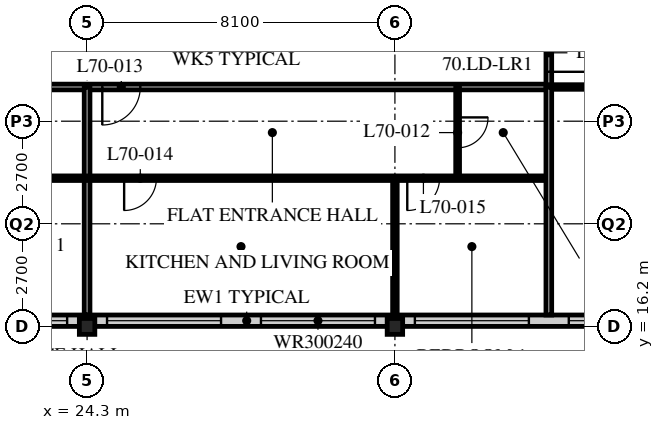
"""IFC4 building model, lengths in metres.
Left out: names, types, materials, properties, quantities, classifications, styles, units other than length and angle.
Written with IfcOpenShell. Run it as: python <this file> out.ifc"""

import sys

from ifc_helpers import new_model, si_unit, direction, frame, frame_2d, origin, origin_2d, place, context, subcontext, project, spatial, rectangle, i_section, extrude, element, fill, save


model = new_model("IFC4")
c1 = context("Model", 3, precision=1e-05, world=origin(), true_north=direction((0.0, 1.0)))
c2 = subcontext(c1, "Body", "Model", "MODEL_VIEW")
j1 = project(units=[si_unit("LENGTHUNIT", "METRE"), si_unit("PLANEANGLEUNIT", "RADIAN")], contexts=[c1])
p1 = place(None, origin())
s1 = spatial("IfcSite", under=j1, at=p1, CompositionType="ELEMENT")
p2 = place(p1, origin())
s2 = spatial("IfcBuilding", under=s1, at=p2, CompositionType="ELEMENT")
p3 = place(p2, frame((0.0, 0.0, 273.6)))
s3 = spatial("IfcBuildingStorey", under=s2, at=p3, CompositionType="ELEMENT", Elevation=273.6)
for number, where, z_axis, x_axis in (
    (1, (24.3, 16.2, 0.0), (0.0, 0.0, 1.0), (1.0, 0.0, 0.0)),
    (2, (32.4, 16.2, 0.0), (0.0, 0.0, 1.0), (1.0, 0.0, 0.0)),
):
    element("IfcColumn", number, at=place(p3, frame(where, z_axis=z_axis, x_axis=x_axis)), inside=s3, PredefinedType="COLUMN", context=c2, shape_type="SweptSolid", body=[
        extrude(i_section(OverallWidth=0.407, OverallDepth=0.419, WebThickness=0.031, FlangeThickness=0.049, FilletRadius=0.015, at=origin_2d()), origin(), (0.0, 0.0, 1.0), 3.9),
    ])
p4 = place(p3, frame((8.4, 16.35, 0.0), z_axis=(0.0, 0.0, 1.0), x_axis=(1.0, 0.0, 0.0)))
e3 = element("IfcWall", 3, at=p4, inside=s3, PredefinedType="SOLIDWALL", context=c2, shape_type="SweptSolid", body=[
    extrude(rectangle(XDim=40.2, YDim=0.3, at=frame_2d((20.1, 0.0))), origin(), (0.0, 0.0, 1.0), 3.69),
])
p5 = place(p4, frame((0.225, 0.0, 0.6)))
e4 = element("IfcOpeningElement", 4, at=p5, cuts=e3, PredefinedType="OPENING", context=c2, shape_type="SweptSolid", body=[
    extrude(rectangle(XDim=3.0, YDim=2.4, at=frame_2d((1.5, 1.2))), frame((0.0, 0.16, 0.0), z_axis=(0.0, -1.0, 0.0), x_axis=(1.0, 0.0, 0.0)), (0.0, 0.0, 1.0), 0.32),
])
p6 = place(p4, frame((4.275, 0.0, 0.6)))
e5 = element("IfcOpeningElement", 5, at=p6, cuts=e3, PredefinedType="OPENING", context=c2, shape_type="SweptSolid", body=[
    extrude(rectangle(XDim=3.0, YDim=2.4, at=frame_2d((1.5, 1.2))), frame((0.0, 0.16, 0.0), z_axis=(0.0, -1.0, 0.0), x_axis=(1.0, 0.0, 0.0)), (0.0, 0.0, 1.0), 0.32),
])
p7 = place(p4, frame((8.325, 0.0, 0.6)))
e6 = element("IfcOpeningElement", 6, at=p7, cuts=e3, PredefinedType="OPENING", context=c2, shape_type="SweptSolid", body=[
    extrude(rectangle(XDim=3.0, YDim=2.4, at=frame_2d((1.5, 1.2))), frame((0.0, 0.16, 0.0), z_axis=(0.0, -1.0, 0.0), x_axis=(1.0, 0.0, 0.0)), (0.0, 0.0, 1.0), 0.32),
])
p8 = place(p4, frame((12.375, 0.0, 0.6)))
e7 = element("IfcOpeningElement", 7, at=p8, cuts=e3, PredefinedType="OPENING", context=c2, shape_type="SweptSolid", body=[
    extrude(rectangle(XDim=3.0, YDim=2.4, at=frame_2d((1.5, 1.2))), frame((0.0, 0.16, 0.0), z_axis=(0.0, -1.0, 0.0), x_axis=(1.0, 0.0, 0.0)), (0.0, 0.0, 1.0), 0.32),
])
p9 = place(p4, frame((16.425, 0.0, 0.6)))
e8 = element("IfcOpeningElement", 8, at=p9, cuts=e3, PredefinedType="OPENING", context=c2, shape_type="SweptSolid", body=[
    extrude(rectangle(XDim=3.0, YDim=2.4, at=frame_2d((1.5, 1.2))), frame((0.0, 0.16, 0.0), z_axis=(0.0, -1.0, 0.0), x_axis=(1.0, 0.0, 0.0)), (0.0, 0.0, 1.0), 0.32),
])
p10 = place(p4, frame((20.475, 0.0, 0.6)))
e9 = element("IfcOpeningElement", 9, at=p10, cuts=e3, PredefinedType="OPENING", context=c2, shape_type="SweptSolid", body=[
    extrude(rectangle(XDim=3.0, YDim=2.4, at=frame_2d((1.5, 1.2))), frame((0.0, 0.16, 0.0), z_axis=(0.0, -1.0, 0.0), x_axis=(1.0, 0.0, 0.0)), (0.0, 0.0, 1.0), 0.32),
])
p11 = place(p4, frame((24.525, 0.0, 0.6)))
e10 = element("IfcOpeningElement", 10, at=p11, cuts=e3, PredefinedType="OPENING", context=c2, shape_type="SweptSolid", body=[
    extrude(rectangle(XDim=3.0, YDim=2.4, at=frame_2d((1.5, 1.2))), frame((0.0, 0.16, 0.0), z_axis=(0.0, -1.0, 0.0), x_axis=(1.0, 0.0, 0.0)), (0.0, 0.0, 1.0), 0.32),
])
p12 = place(p4, frame((28.575, 0.0, 0.6)))
e11 = element("IfcOpeningElement", 11, at=p12, cuts=e3, PredefinedType="OPENING", context=c2, shape_type="SweptSolid", body=[
    extrude(rectangle(XDim=3.0, YDim=2.4, at=frame_2d((1.5, 1.2))), frame((0.0, 0.16, 0.0), z_axis=(0.0, -1.0, 0.0), x_axis=(1.0, 0.0, 0.0)), (0.0, 0.0, 1.0), 0.32),
])
p13 = place(p4, frame((32.625, 0.0, 0.6)))
e12 = element("IfcOpeningElement", 12, at=p13, cuts=e3, PredefinedType="OPENING", context=c2, shape_type="SweptSolid", body=[
    extrude(rectangle(XDim=3.0, YDim=2.4, at=frame_2d((1.5, 1.2))), frame((0.0, 0.16, 0.0), z_axis=(0.0, -1.0, 0.0), x_axis=(1.0, 0.0, 0.0)), (0.0, 0.0, 1.0), 0.32),
])
p14 = place(p4, frame((36.675, 0.0, 0.6)))
e13 = element("IfcOpeningElement", 13, at=p14, cuts=e3, PredefinedType="OPENING", context=c2, shape_type="SweptSolid", body=[
    extrude(rectangle(XDim=3.0, YDim=2.4, at=frame_2d((1.5, 1.2))), frame((0.0, 0.16, 0.0), z_axis=(0.0, -1.0, 0.0), x_axis=(1.0, 0.0, 0.0)), (0.0, 0.0, 1.0), 0.32),
])
p15 = place(p3, frame((12.15, 22.5, 0.0), z_axis=(0.0, 0.0, 1.0), x_axis=(1.0, 0.0, 0.0)))
e14 = element("IfcWall", 14, at=p15, inside=s3, PredefinedType="PARTITIONING", context=c2, shape_type="SweptSolid", body=[
    extrude(rectangle(XDim=24.3, YDim=0.15, at=frame_2d((12.15, 0.0))), origin(), (0.0, 0.0, 1.0), 3.69),
])
p16 = place(p15, frame((4.45, 0.0, 0.0)))
e15 = element("IfcOpeningElement", 15, at=p16, cuts=e14, PredefinedType="OPENING", context=c2, shape_type="SweptSolid", body=[
    extrude(rectangle(XDim=1.0, YDim=2.1, at=frame_2d((0.5, 1.05))), frame((0.0, 0.085, 0.0), z_axis=(0.0, -1.0, 0.0), x_axis=(1.0, 0.0, 0.0)), (0.0, 0.0, 1.0), 0.17),
])
p17 = place(p15, frame((12.55, 0.0, 0.0)))
e16 = element("IfcOpeningElement", 16, at=p17, cuts=e14, PredefinedType="OPENING", context=c2, shape_type="SweptSolid", body=[
    extrude(rectangle(XDim=1.0, YDim=2.1, at=frame_2d((0.5, 1.05))), frame((0.0, 0.085, 0.0), z_axis=(0.0, -1.0, 0.0), x_axis=(1.0, 0.0, 0.0)), (0.0, 0.0, 1.0), 0.17),
])
p18 = place(p15, frame((2.625, 0.0, 0.0)))
e17 = element("IfcOpeningElement", 17, at=p18, cuts=e14, PredefinedType="OPENING", context=c2, shape_type="SweptSolid", body=[
    extrude(rectangle(XDim=1.0, YDim=2.1, at=frame_2d((0.5, 1.05))), frame((0.0, 0.085, 0.0), z_axis=(0.0, -1.0, 0.0), x_axis=(1.0, 0.0, 0.0)), (0.0, 0.0, 1.0), 0.17),
])
p19 = place(p3, frame((36.45, 22.5, 0.0), z_axis=(0.0, 0.0, 1.0), x_axis=(0.0, 1.0, 0.0)))
e18 = element("IfcWall", 18, at=p19, inside=s3, PredefinedType="PARTITIONING", context=c2, shape_type="SweptSolid", body=[
    extrude(rectangle(XDim=1.8, YDim=0.15, at=frame_2d((0.9, 0.0))), origin(), (0.0, 0.0, 1.0), 3.69),
])
p20 = place(p19, frame((0.4, 0.0, 0.0)))
e19 = element("IfcOpeningElement", 19, at=p20, cuts=e18, PredefinedType="OPENING", context=c2, shape_type="SweptSolid", body=[
    extrude(rectangle(XDim=1.0, YDim=2.1, at=frame_2d((0.5, 1.05))), frame((0.0, 0.085, 0.0), z_axis=(0.0, -1.0, 0.0), x_axis=(1.0, 0.0, 0.0)), (0.0, 0.0, 1.0), 0.17),
])
p21 = place(p3, frame((24.3, 22.5, 0.0), z_axis=(0.0, 0.0, 1.0), x_axis=(0.0, -1.0, 0.0)))
e20 = element("IfcWall", 20, at=p21, inside=s3, PredefinedType="PARTITIONING", context=c2, shape_type="SweptSolid", body=[
    extrude(rectangle(XDim=6.0, YDim=0.15, at=frame_2d((3.0, 0.0))), origin(), (0.0, 0.0, 1.0), 3.078),
])
p22 = place(p3, frame((34.05, 22.5, 0.0), z_axis=(0.0, 0.0, 1.0), x_axis=(0.0, -1.0, 0.0)))
e21 = element("IfcWall", 21, at=p22, inside=s3, PredefinedType="PARTITIONING", context=c2, shape_type="SweptSolid", body=[
    extrude(rectangle(XDim=2.4, YDim=0.1, at=frame_2d((1.2, 0.0))), origin(), (0.0, 0.0, 1.0), 3.69),
])
p23 = place(p22, frame((0.8, 0.0, 0.0)))
e22 = element("IfcOpeningElement", 22, at=p23, cuts=e21, PredefinedType="OPENING", context=c2, shape_type="SweptSolid", body=[
    extrude(rectangle(XDim=0.8, YDim=2.1, at=frame_2d((0.4, 1.05))), frame((0.0, 0.06, 0.0), z_axis=(0.0, -1.0, 0.0), x_axis=(1.0, 0.0, 0.0)), (0.0, 0.0, 1.0), 0.12),
])
p24 = place(p3, frame((32.4, 20.1, 0.0), z_axis=(0.0, 0.0, 1.0), x_axis=(0.0, -1.0, 0.0)))
e23 = element("IfcWall", 23, at=p24, inside=s3, PredefinedType="PARTITIONING", context=c2, shape_type="SweptSolid", body=[
    extrude(rectangle(XDim=3.6, YDim=0.12, at=frame_2d((1.8, 0.0))), origin(), (0.0, 0.0, 1.0), 3.078),
])
p25 = place(p3, frame((12.15, 20.1, 0.0), z_axis=(0.0, 0.0, 1.0), x_axis=(1.0, 0.0, 0.0)))
e24 = element("IfcWall", 24, at=p25, inside=s3, PredefinedType="PARTITIONING", context=c2, shape_type="SweptSolid", body=[
    extrude(rectangle(XDim=24.3, YDim=0.12, at=frame_2d((12.15, 0.0))), origin(), (0.0, 0.0, 1.0), 3.69),
])
p26 = place(p25, frame((5.025, 0.0, 0.0)))
e25 = element("IfcOpeningElement", 25, at=p26, cuts=e24, PredefinedType="OPENING", context=c2, shape_type="SweptSolid", body=[
    extrude(rectangle(XDim=0.85, YDim=2.1, at=frame_2d((0.425, 1.05))), frame((0.0, 0.07, 0.0), z_axis=(0.0, -1.0, 0.0), x_axis=(1.0, 0.0, 0.0)), (0.0, 0.0, 1.0), 0.14),
])
p27 = place(p25, frame((8.425, 0.0, 0.0)))
e26 = element("IfcOpeningElement", 26, at=p27, cuts=e24, PredefinedType="OPENING", context=c2, shape_type="SweptSolid", body=[
    extrude(rectangle(XDim=0.85, YDim=2.1, at=frame_2d((0.425, 1.05))), frame((0.0, 0.07, 0.0), z_axis=(0.0, -1.0, 0.0), x_axis=(1.0, 0.0, 0.0)), (0.0, 0.0, 1.0), 0.14),
])
p28 = place(p25, frame((13.125, 0.0, 0.0)))
e27 = element("IfcOpeningElement", 27, at=p28, cuts=e24, PredefinedType="OPENING", context=c2, shape_type="SweptSolid", body=[
    extrude(rectangle(XDim=0.85, YDim=2.1, at=frame_2d((0.425, 1.05))), frame((0.0, 0.07, 0.0), z_axis=(0.0, -1.0, 0.0), x_axis=(1.0, 0.0, 0.0)), (0.0, 0.0, 1.0), 0.14),
])
p29 = place(p25, frame((20.575, 0.0, 0.0)))
e28 = element("IfcOpeningElement", 28, at=p29, cuts=e24, PredefinedType="OPENING", context=c2, shape_type="SweptSolid", body=[
    extrude(rectangle(XDim=0.85, YDim=2.1, at=frame_2d((0.425, 1.05))), frame((0.0, 0.07, 0.0), z_axis=(0.0, -1.0, 0.0), x_axis=(1.0, 0.0, 0.0)), (0.0, 0.0, 1.0), 0.14),
])
p30 = place(p25, frame((2.725, 0.0, 0.0)))
e29 = element("IfcOpeningElement", 29, at=p30, cuts=e24, PredefinedType="OPENING", context=c2, shape_type="SweptSolid", body=[
    extrude(rectangle(XDim=0.85, YDim=2.1, at=frame_2d((0.425, 1.05))), frame((0.0, 0.07, 0.0), z_axis=(0.0, -1.0, 0.0), x_axis=(1.0, 0.0, 0.0)), (0.0, 0.0, 1.0), 0.14),
])
p31 = place(p3, frame((36.45, 22.5, 0.0), z_axis=(0.0, 0.0, 1.0), x_axis=(1.0, 0.0, 0.0)))
e30 = element("IfcWall", 30, at=p31, inside=s3, PredefinedType="PARTITIONING", context=c2, shape_type="SweptSolid", body=[
    extrude(rectangle(XDim=6.45, YDim=0.12, at=frame_2d((3.225, 0.0))), origin(), (0.0, 0.0, 1.0), 3.69),
])
p32 = place(p31, frame((2.8, 0.0, 0.0)))
e31 = element("IfcOpeningElement", 31, at=p32, cuts=e30, PredefinedType="OPENING", context=c2, shape_type="SweptSolid", body=[
    extrude(rectangle(XDim=0.85, YDim=2.1, at=frame_2d((0.425, 1.05))), frame((0.0, 0.07, 0.0), z_axis=(0.0, -1.0, 0.0), x_axis=(1.0, 0.0, 0.0)), (0.0, 0.0, 1.0), 0.14),
])
p33 = place(p3, frame((36.45, 16.5, 0.0), z_axis=(0.0, 0.0, 1.0), x_axis=(0.0, 1.0, 0.0)))
e32 = element("IfcWall", 32, at=p33, inside=s3, PredefinedType="PARTITIONING", context=c2, shape_type="SweptSolid", body=[
    extrude(rectangle(XDim=6.0, YDim=0.15, at=frame_2d((3.0, 0.0))), origin(), (0.0, 0.0, 1.0), 3.69),
])
p34 = place(p8, origin())
e33 = element("IfcWindow", 33, at=p34, inside=s3, PartitioningType="SINGLE_PANEL", PredefinedType="WINDOW", context=c2, shape_type="SweptSolid", body=[
    extrude(rectangle(XDim=3.0, YDim=2.4, at=frame_2d((1.5, 1.2))), frame((0.0, 0.03, 0.0), z_axis=(0.0, -1.0, 0.0), x_axis=(1.0, 0.0, 0.0)), (0.0, 0.0, 1.0), 0.06),
])
fill(e7, e33)
p35 = place(p9, origin())
e34 = element("IfcWindow", 34, at=p35, inside=s3, PartitioningType="SINGLE_PANEL", PredefinedType="WINDOW", context=c2, shape_type="SweptSolid", body=[
    extrude(rectangle(XDim=3.0, YDim=2.4, at=frame_2d((1.5, 1.2))), frame((0.0, 0.03, 0.0), z_axis=(0.0, -1.0, 0.0), x_axis=(1.0, 0.0, 0.0)), (0.0, 0.0, 1.0), 0.06),
])
fill(e8, e34)
p36 = place(p10, origin())
e35 = element("IfcWindow", 35, at=p36, inside=s3, PartitioningType="SINGLE_PANEL", PredefinedType="WINDOW", context=c2, shape_type="SweptSolid", body=[
    extrude(rectangle(XDim=3.0, YDim=2.4, at=frame_2d((1.5, 1.2))), frame((0.0, 0.03, 0.0), z_axis=(0.0, -1.0, 0.0), x_axis=(1.0, 0.0, 0.0)), (0.0, 0.0, 1.0), 0.06),
])
fill(e9, e35)
p37 = place(p11, origin())
e36 = element("IfcWindow", 36, at=p37, inside=s3, PartitioningType="SINGLE_PANEL", PredefinedType="WINDOW", context=c2, shape_type="SweptSolid", body=[
    extrude(rectangle(XDim=3.0, YDim=2.4, at=frame_2d((1.5, 1.2))), frame((0.0, 0.03, 0.0), z_axis=(0.0, -1.0, 0.0), x_axis=(1.0, 0.0, 0.0)), (0.0, 0.0, 1.0), 0.06),
])
fill(e10, e36)
p38 = place(p12, origin())
e37 = element("IfcWindow", 37, at=p38, inside=s3, PartitioningType="SINGLE_PANEL", PredefinedType="WINDOW", context=c2, shape_type="SweptSolid", body=[
    extrude(rectangle(XDim=3.0, YDim=2.4, at=frame_2d((1.5, 1.2))), frame((0.0, 0.03, 0.0), z_axis=(0.0, -1.0, 0.0), x_axis=(1.0, 0.0, 0.0)), (0.0, 0.0, 1.0), 0.06),
])
fill(e11, e37)
p39 = place(p23, origin())
e38 = element("IfcDoor", 38, at=p39, inside=s3, OperationType="SINGLE_SWING_LEFT", PredefinedType="DOOR", context=c2, shape_type="SweptSolid", body=[
    extrude(rectangle(XDim=0.8, YDim=2.1, at=frame_2d((0.4, 1.05))), frame((0.0, 0.025, 0.0), z_axis=(0.0, -1.0, 0.0), x_axis=(1.0, 0.0, 0.0)), (0.0, 0.0, 1.0), 0.05),
])
fill(e22, e38)
p40 = place(p17, origin())
e39 = element("IfcDoor", 39, at=p40, inside=s3, OperationType="SINGLE_SWING_RIGHT", PredefinedType="DOOR", context=c2, shape_type="SweptSolid", body=[
    extrude(rectangle(XDim=1.0, YDim=2.1, at=frame_2d((0.5, 1.05))), frame((0.0, 0.025, 0.0), z_axis=(0.0, -1.0, 0.0), x_axis=(1.0, 0.0, 0.0)), (0.0, 0.0, 1.0), 0.05),
])
fill(e16, e39)
p41 = place(p28, origin())
e40 = element("IfcDoor", 40, at=p41, inside=s3, OperationType="SINGLE_SWING_RIGHT", PredefinedType="DOOR", context=c2, shape_type="SweptSolid", body=[
    extrude(rectangle(XDim=0.85, YDim=2.1, at=frame_2d((0.425, 1.05))), frame((0.0, 0.025, 0.0), z_axis=(0.0, -1.0, 0.0), x_axis=(1.0, 0.0, 0.0)), (0.0, 0.0, 1.0), 0.05),
])
fill(e27, e40)
p42 = place(p29, origin())
e41 = element("IfcDoor", 41, at=p42, inside=s3, OperationType="SINGLE_SWING_RIGHT", PredefinedType="DOOR", context=c2, shape_type="SweptSolid", body=[
    extrude(rectangle(XDim=0.85, YDim=2.1, at=frame_2d((0.425, 1.05))), frame((0.0, 0.025, 0.0), z_axis=(0.0, -1.0, 0.0), x_axis=(1.0, 0.0, 0.0)), (0.0, 0.0, 1.0), 0.05),
])
fill(e28, e41)
p43 = place(p20, origin())
e42 = element("IfcDoor", 42, at=p43, inside=s3, OperationType="SINGLE_SWING_RIGHT", PredefinedType="DOOR", context=c2, shape_type="SweptSolid", body=[
    extrude(rectangle(XDim=1.0, YDim=2.1, at=frame_2d((0.5, 1.05))), frame((0.0, 0.025, 0.0), z_axis=(0.0, -1.0, 0.0), x_axis=(1.0, 0.0, 0.0)), (0.0, 0.0, 1.0), 0.05),
])
fill(e19, e42)
save(model, sys.argv[1])
